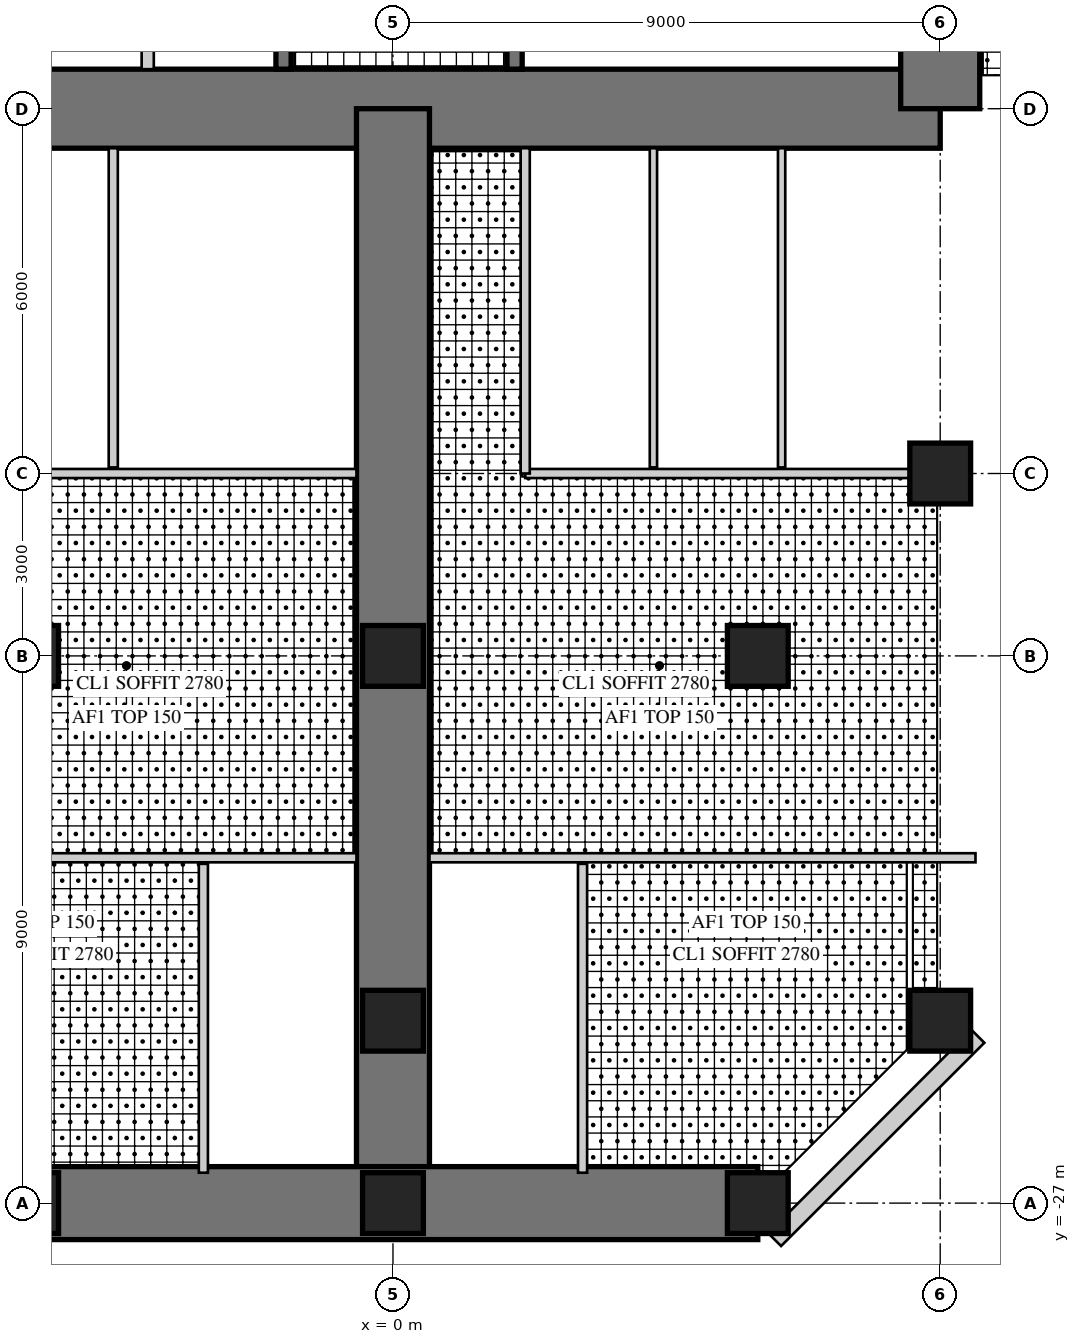
"""IFC4 building model, lengths in metres.
Left out: names, types, materials, properties, quantities, classifications, styles, units other than length and angle.
Written with IfcOpenShell. Run it as: python <this file> out.ifc"""

import sys

from ifc_helpers import new_model, si_unit, direction, frame, frame_2d, origin, origin_2d, place, context, subcontext, project, spatial, rectangle, hollow_rectangle, extrude, element, fill, save


model = new_model("IFC4")
c1 = context("Model", 3, precision=1e-05, world=origin(), true_north=direction((0.0, 1.0)))
c2 = subcontext(c1, "Body", "Model", "MODEL_VIEW")
j1 = project(units=[si_unit("LENGTHUNIT", "METRE"), si_unit("PLANEANGLEUNIT", "RADIAN")], contexts=[c1])
p1 = place(None, origin())
s1 = spatial("IfcSite", under=j1, at=p1, CompositionType="ELEMENT")
p2 = place(p1, origin())
s2 = spatial("IfcBuilding", under=s1, at=p2, CompositionType="ELEMENT")
p3 = place(p2, frame((0.0, 0.0, 152.5)))
s3 = spatial("IfcBuildingStorey", under=s2, at=p3, CompositionType="ELEMENT", Elevation=152.5)
p4 = place(p3, frame((-9.0, -9.0, 0.0), z_axis=(0.0, 0.0, 1.0), x_axis=(1.0, 0.0, 0.0)))
e1 = element("IfcWall", 1, at=p4, inside=s3, PredefinedType="SHEAR", context=c2, shape_type="SweptSolid", body=[
    extrude(rectangle(XDim=18.0, YDim=1.3, at=frame_2d((9.0, 0.0))), origin(), (0.0, 0.0, 1.0), 4.0),
])
p5 = place(p4, frame((9.8, 0.0, 0.0)))
e2 = element("IfcOpeningElement", 2, at=p5, cuts=e1, PredefinedType="OPENING", context=c2, shape_type="SweptSolid", body=[
    extrude(rectangle(XDim=1.0, YDim=2.4, at=frame_2d((0.5, 1.2))), frame((0.0, 0.66, 0.0), z_axis=(0.0, -1.0, 0.0), x_axis=(1.0, 0.0, 0.0)), (0.0, 0.0, 1.0), 1.32),
])
p6 = place(p3, frame((9.0, -9.0, 0.0), z_axis=(0.0, 0.0, 1.0), x_axis=(0.0, 1.0, 0.0)))
e3 = element("IfcWall", 3, at=p6, inside=s3, PredefinedType="SHEAR", context=c2, shape_type="SweptSolid", body=[
    extrude(rectangle(XDim=18.0, YDim=1.3, at=frame_2d((9.0, 0.0))), origin(), (0.0, 0.0, 1.0), 4.0),
])
p7 = place(p6, frame((9.8, 0.0, 0.0)))
e4 = element("IfcOpeningElement", 4, at=p7, cuts=e3, PredefinedType="OPENING", context=c2, shape_type="SweptSolid", body=[
    extrude(rectangle(XDim=1.0, YDim=2.4, at=frame_2d((0.5, 1.2))), frame((0.0, 0.66, 0.0), z_axis=(0.0, -1.0, 0.0), x_axis=(1.0, 0.0, 0.0)), (0.0, 0.0, 1.0), 1.32),
])
p8 = place(p3, frame((-1.8, -1.875, 0.0), z_axis=(0.0, 0.0, 1.0), x_axis=(0.0, -1.0, 0.0)))
e5 = element("IfcWall", 5, at=p8, inside=s3, PredefinedType="SHEAR", context=c2, shape_type="SweptSolid", body=[
    extrude(rectangle(XDim=6.475, YDim=0.25, at=frame_2d((3.238, 0.0))), origin(), (0.0, 0.0, 1.0), 4.0),
])
p9 = place(p8, frame((1.875, 0.0, 0.0)))
e6 = element("IfcOpeningElement", 6, at=p9, cuts=e5, PredefinedType="OPENING", context=c2, shape_type="SweptSolid", body=[
    extrude(rectangle(XDim=1.6, YDim=2.4, at=frame_2d((0.8, 1.2))), frame((0.0, 0.135, 0.0), z_axis=(0.0, -1.0, 0.0), x_axis=(1.0, 0.0, 0.0)), (0.0, 0.0, 1.0), 0.27),
])
p10 = place(p3, frame((-4.033, -5.975, 0.0), z_axis=(0.0, 0.0, 1.0), x_axis=(0.0, -1.0, 0.0)))
e7 = element("IfcWall", 7, at=p10, inside=s3, PredefinedType="PARTITIONING", context=c2, shape_type="SweptSolid", body=[
    extrude(rectangle(XDim=2.375, YDim=0.2, at=frame_2d((1.188, 0.0))), origin(), (0.0, 0.0, 1.0), 4.0),
])
p11 = place(p3, frame((2.0, -1.675, 0.0), z_axis=(0.0, 0.0, 1.0), x_axis=(0.0, -1.0, 0.0)))
e8 = element("IfcWall", 8, at=p11, inside=s3, PredefinedType="SHEAR", context=c2, shape_type="SweptSolid", body=[
    extrude(rectangle(XDim=6.675, YDim=0.25, at=frame_2d((3.337, 0.0))), origin(), (0.0, 0.0, 1.0), 4.0),
])
p12 = place(p11, frame((0.725, 0.0, 0.0)))
e9 = element("IfcOpeningElement", 9, at=p12, cuts=e8, PredefinedType="OPENING", context=c2, shape_type="SweptSolid", body=[
    extrude(rectangle(XDim=1.0, YDim=2.1, at=frame_2d((0.5, 1.05))), frame((0.0, 0.135, 0.0), z_axis=(0.0, -1.0, 0.0), x_axis=(1.0, 0.0, 0.0)), (0.0, 0.0, 1.0), 0.27),
])
p13 = place(p3, frame((0.0, -9.0, 0.0), z_axis=(0.0, 0.0, 1.0), x_axis=(0.0, -1.0, 0.0)))
e10 = element("IfcWall", 10, at=p13, inside=s3, PredefinedType="SHEAR", context=c2, shape_type="SweptSolid", body=[
    extrude(rectangle(XDim=18.0, YDim=1.2, at=frame_2d((9.0, 0.0))), origin(), (0.0, 0.0, 1.0), 4.0),
])
p14 = place(p13, frame((9.8, 0.0, 0.0)))
e11 = element("IfcOpeningElement", 11, at=p14, cuts=e10, PredefinedType="OPENING", context=c2, shape_type="SweptSolid", body=[
    extrude(rectangle(XDim=1.0, YDim=2.2, at=frame_2d((0.5, 1.1))), frame((0.0, 0.61, 0.0), z_axis=(0.0, -1.0, 0.0), x_axis=(1.0, 0.0, 0.0)), (0.0, 0.0, 1.0), 1.22),
])
p15 = place(p3, frame((-6.0, -27.0, 0.0), z_axis=(0.0, 0.0, 1.0), x_axis=(1.0, 0.0, 0.0)))
e12 = element("IfcWall", 12, at=p15, inside=s3, PredefinedType="SHEAR", context=c2, shape_type="SweptSolid", body=[
    extrude(rectangle(XDim=12.0, YDim=1.2, at=frame_2d((6.0, 0.0))), origin(), (0.0, 0.0, 1.0), 4.0),
])
p16 = place(p15, frame((1.55, 0.0, 0.6)))
e13 = element("IfcOpeningElement", 13, at=p16, cuts=e12, PredefinedType="OPENING", context=c2, shape_type="SweptSolid", body=[
    extrude(rectangle(XDim=3.0, YDim=2.4, at=frame_2d((1.5, 1.2))), frame((0.0, 0.61, 0.0), z_axis=(0.0, -1.0, 0.0), x_axis=(1.0, 0.0, 0.0)), (0.0, 0.0, 1.0), 1.22),
])
p17 = place(p15, frame((7.45, 0.0, 0.6)))
e14 = element("IfcOpeningElement", 14, at=p17, cuts=e12, PredefinedType="OPENING", context=c2, shape_type="SweptSolid", body=[
    extrude(rectangle(XDim=3.0, YDim=2.4, at=frame_2d((1.5, 1.2))), frame((0.0, 0.61, 0.0), z_axis=(0.0, -1.0, 0.0), x_axis=(1.0, 0.0, 0.0)), (0.0, 0.0, 1.0), 1.22),
])
for number, where, z_axis, x_axis in (
    (15, (9.0, -15.0, 0.0), (0.0, 0.0, 1.0), (1.0, 0.0, 0.0)),
    (16, (9.0, -24.0, 0.0), (0.0, 0.0, 1.0), (1.0, 0.0, 0.0)),
    (17, (-6.0, -27.0, 0.0), (0.0, 0.0, 1.0), (1.0, 0.0, 0.0)),
    (18, (0.0, -27.0, 0.0), (0.0, 0.0, 1.0), (1.0, 0.0, 0.0)),
    (19, (6.0, -27.0, 0.0), (0.0, 0.0, 1.0), (1.0, 0.0, 0.0)),
    (20, (-6.0, -18.0, 0.0), (0.0, 0.0, 1.0), (1.0, 0.0, 0.0)),
    (21, (0.0, -18.0, 0.0), (0.0, 0.0, 1.0), (1.0, 0.0, 0.0)),
    (22, (6.0, -18.0, 0.0), (0.0, 0.0, 1.0), (1.0, 0.0, 0.0)),
    (23, (0.0, -24.0, 0.0), (0.0, 0.0, 1.0), (1.0, 0.0, 0.0)),
):
    element("IfcColumn", number, at=place(p3, frame(where, z_axis=z_axis, x_axis=x_axis)), inside=s3, PredefinedType="COLUMN", context=c2, shape_type="SweptSolid", body=[
        extrude(rectangle(XDim=1.0, YDim=1.0, at=origin_2d()), origin(), (0.0, 0.0, 1.0), 4.0),
    ])
p18 = place(p3, frame((6.277, -27.6, 0.0), z_axis=(0.0, 0.0, 1.0), x_axis=(0.707106781187, 0.707106781187, 0.0)))
e24 = element("IfcWall", 24, at=p18, inside=s3, PredefinedType="SOLIDWALL", context=c2, shape_type="SweptSolid", body=[
    extrude(rectangle(XDim=4.728, YDim=0.3, at=frame_2d((2.364, 0.0))), origin(), (0.0, 0.0, 1.0), 3.8),
])
p19 = place(p18, frame((1.914, 0.0, 0.3)))
e25 = element("IfcOpeningElement", 25, at=p19, cuts=e24, PredefinedType="OPENING", context=c2, shape_type="SweptSolid", body=[
    extrude(rectangle(XDim=0.9, YDim=2.4, at=frame_2d((0.45, 1.2))), frame((0.0, 0.16, 0.0), z_axis=(0.0, -1.0, 0.0), x_axis=(1.0, 0.0, 0.0)), (0.0, 0.0, 1.0), 0.32),
])
p20 = place(p3, frame((2.175, -15.0, 0.0), z_axis=(0.0, 0.0, 1.0), x_axis=(1.0, 0.0, 0.0)))
e26 = element("IfcWall", 26, at=p20, inside=s3, PredefinedType="PARTITIONING", context=c2, shape_type="SweptSolid", body=[
    extrude(rectangle(XDim=6.325, YDim=0.15, at=frame_2d((3.163, 0.0))), origin(), (0.0, 0.0, 1.0), 3.0),
])
p21 = place(p20, frame((0.554, 0.0, 0.0)))
e27 = element("IfcOpeningElement", 27, at=p21, cuts=e26, PredefinedType="OPENING", context=c2, shape_type="SweptSolid", body=[
    extrude(rectangle(XDim=1.0, YDim=2.1, at=frame_2d((0.5, 1.05))), frame((0.0, 0.085, 0.0), z_axis=(0.0, -1.0, 0.0), x_axis=(1.0, 0.0, 0.0)), (0.0, 0.0, 1.0), 0.17),
])
p22 = place(p20, frame((2.663, 0.0, 0.0)))
e28 = element("IfcOpeningElement", 28, at=p22, cuts=e26, PredefinedType="OPENING", context=c2, shape_type="SweptSolid", body=[
    extrude(rectangle(XDim=1.0, YDim=2.1, at=frame_2d((0.5, 1.05))), frame((0.0, 0.085, 0.0), z_axis=(0.0, -1.0, 0.0), x_axis=(1.0, 0.0, 0.0)), (0.0, 0.0, 1.0), 0.17),
])
p23 = place(p20, frame((4.771, 0.0, 0.0)))
e29 = element("IfcOpeningElement", 29, at=p23, cuts=e26, PredefinedType="OPENING", context=c2, shape_type="SweptSolid", body=[
    extrude(rectangle(XDim=1.0, YDim=2.1, at=frame_2d((0.5, 1.05))), frame((0.0, 0.085, 0.0), z_axis=(0.0, -1.0, 0.0), x_axis=(1.0, 0.0, 0.0)), (0.0, 0.0, 1.0), 0.17),
])
p24 = place(p3, frame((2.175, -9.65, 0.0), z_axis=(0.0, 0.0, 1.0), x_axis=(0.0, -1.0, 0.0)))
e30 = element("IfcWall", 30, at=p24, inside=s3, PredefinedType="PARTITIONING", context=c2, shape_type="SweptSolid", body=[
    extrude(rectangle(XDim=5.35, YDim=0.15, at=frame_2d((2.675, 0.0))), origin(), (0.0, 0.0, 1.0), 3.8),
])
for number, where, z_axis, x_axis in (
    (31, (4.283, -9.65, 0.0), (0.0, 0.0, 1.0), (0.0, -1.0, 0.0)),
    (32, (6.392, -9.65, 0.0), (0.0, 0.0, 1.0), (0.0, -1.0, 0.0)),
):
    element("IfcWall", number, at=place(p3, frame(where, z_axis=z_axis, x_axis=x_axis)), inside=s3, PredefinedType="PLUMBINGWALL", context=c2, shape_type="SweptSolid", body=[
        extrude(rectangle(XDim=5.25, YDim=0.12, at=frame_2d((2.625, 0.0))), origin(), (0.0, 0.0, 1.0), 3.8),
    ])
p25 = place(p3, frame((-8.5, -15.0, 0.0), z_axis=(0.0, 0.0, 1.0), x_axis=(1.0, 0.0, 0.0)))
e33 = element("IfcWall", 33, at=p25, inside=s3, PredefinedType="PARTITIONING", context=c2, shape_type="SweptSolid", body=[
    extrude(rectangle(XDim=7.9, YDim=0.15, at=frame_2d((3.95, 0.0))), origin(), (0.0, 0.0, 1.0), 3.0),
])
p26 = place(p25, frame((1.45, 0.0, 0.0)))
e34 = element("IfcOpeningElement", 34, at=p26, cuts=e33, PredefinedType="OPENING", context=c2, shape_type="SweptSolid", body=[
    extrude(rectangle(XDim=1.0, YDim=2.1, at=frame_2d((0.5, 1.05))), frame((0.0, 0.085, 0.0), z_axis=(0.0, -1.0, 0.0), x_axis=(1.0, 0.0, 0.0)), (0.0, 0.0, 1.0), 0.17),
])
p27 = place(p25, frame((5.4, 0.0, 0.0)))
e35 = element("IfcOpeningElement", 35, at=p27, cuts=e33, PredefinedType="OPENING", context=c2, shape_type="SweptSolid", body=[
    extrude(rectangle(XDim=1.0, YDim=2.1, at=frame_2d((0.5, 1.05))), frame((0.0, 0.085, 0.0), z_axis=(0.0, -1.0, 0.0), x_axis=(1.0, 0.0, 0.0)), (0.0, 0.0, 1.0), 0.17),
])
p28 = place(p3, frame((-4.6, -9.65, 0.0), z_axis=(0.0, 0.0, 1.0), x_axis=(0.0, -1.0, 0.0)))
e36 = element("IfcWall", 36, at=p28, inside=s3, PredefinedType="PARTITIONING", context=c2, shape_type="SweptSolid", body=[
    extrude(rectangle(XDim=5.25, YDim=0.15, at=frame_2d((2.625, 0.0))), origin(), (0.0, 0.0, 1.0), 3.8),
])
p29 = place(p3, frame((3.118, -21.42, 0.0), z_axis=(0.0, 0.0, 1.0), x_axis=(0.0, -1.0, 0.0)))
e37 = element("IfcWall", 37, at=p29, inside=s3, PredefinedType="PARTITIONING", context=c2, shape_type="SweptSolid", body=[
    extrude(rectangle(XDim=5.08, YDim=0.15, at=frame_2d((2.54, 0.0))), origin(), (0.0, 0.0, 1.0), 3.8),
])
p30 = place(p3, frame((0.6, -21.32, 0.0), z_axis=(0.0, 0.0, 1.0), x_axis=(1.0, 0.0, 0.0)))
e38 = element("IfcWall", 38, at=p30, inside=s3, PredefinedType="PARTITIONING", context=c2, shape_type="SweptSolid", body=[
    extrude(rectangle(XDim=8.98, YDim=0.15, at=frame_2d((4.49, 0.0))), origin(), (0.0, 0.0, 1.0), 3.8),
])
p31 = place(p30, frame((0.35, 0.0, 0.0)))
e39 = element("IfcOpeningElement", 39, at=p31, cuts=e38, PredefinedType="OPENING", context=c2, shape_type="SweptSolid", body=[
    extrude(rectangle(XDim=1.0, YDim=2.2, at=frame_2d((0.5, 1.1))), frame((0.0, 0.085, 0.0), z_axis=(0.0, -1.0, 0.0), x_axis=(1.0, 0.0, 0.0)), (0.0, 0.0, 1.0), 0.17),
])
p32 = place(p30, frame((2.993, 0.0, 0.0)))
e40 = element("IfcOpeningElement", 40, at=p32, cuts=e38, PredefinedType="OPENING", context=c2, shape_type="SweptSolid", body=[
    extrude(rectangle(XDim=1.0, YDim=2.2, at=frame_2d((0.5, 1.1))), frame((0.0, 0.085, 0.0), z_axis=(0.0, -1.0, 0.0), x_axis=(1.0, 0.0, 0.0)), (0.0, 0.0, 1.0), 0.17),
])
p33 = place(p3, frame((-3.118, -21.42, 0.0), z_axis=(0.0, 0.0, 1.0), x_axis=(0.0, -1.0, 0.0)))
e41 = element("IfcWall", 41, at=p33, inside=s3, PredefinedType="PARTITIONING", context=c2, shape_type="SweptSolid", body=[
    extrude(rectangle(XDim=5.08, YDim=0.15, at=frame_2d((2.54, 0.0))), origin(), (0.0, 0.0, 1.0), 3.8),
])
p34 = place(p3, frame((-9.58, -21.32, 0.0), z_axis=(0.0, 0.0, 1.0), x_axis=(1.0, 0.0, 0.0)))
e42 = element("IfcWall", 42, at=p34, inside=s3, PredefinedType="PARTITIONING", context=c2, shape_type="SweptSolid", body=[
    extrude(rectangle(XDim=8.98, YDim=0.15, at=frame_2d((4.49, 0.0))), origin(), (0.0, 0.0, 1.0), 3.8),
])
p35 = place(p34, frame((4.987, 0.0, 0.0)))
e43 = element("IfcOpeningElement", 43, at=p35, cuts=e42, PredefinedType="OPENING", context=c2, shape_type="SweptSolid", body=[
    extrude(rectangle(XDim=1.0, YDim=2.2, at=frame_2d((0.5, 1.1))), frame((0.0, 0.085, 0.0), z_axis=(0.0, -1.0, 0.0), x_axis=(1.0, 0.0, 0.0)), (0.0, 0.0, 1.0), 0.17),
])
p36 = place(p34, frame((7.63, 0.0, 0.0)))
e44 = element("IfcOpeningElement", 44, at=p36, cuts=e42, PredefinedType="OPENING", context=c2, shape_type="SweptSolid", body=[
    extrude(rectangle(XDim=1.0, YDim=2.2, at=frame_2d((0.5, 1.1))), frame((0.0, 0.085, 0.0), z_axis=(0.0, -1.0, 0.0), x_axis=(1.0, 0.0, 0.0)), (0.0, 0.0, 1.0), 0.17),
])
p37 = place(p16, origin())
e45 = element("IfcWindow", 45, at=p37, inside=s3, PartitioningType="SINGLE_PANEL", PredefinedType="WINDOW", context=c2, shape_type="SweptSolid", body=[
    extrude(hollow_rectangle(XDim=3.0, YDim=2.4, WallThickness=0.06, at=frame_2d((1.5, 1.2))), frame((0.0, 0.03, 0.0), z_axis=(0.0, -1.0, 0.0), x_axis=(1.0, 0.0, 0.0)), (0.0, 0.0, 1.0), 0.06),
    extrude(rectangle(XDim=2.879, YDim=2.279, at=frame_2d((1.5, 1.2))), frame((0.0, 0.03, 0.0), z_axis=(0.0, -1.0, 0.0), x_axis=(1.0, 0.0, 0.0)), (0.0, 0.0, 1.0), 0.06),
])
fill(e13, e45)
p38 = place(p17, origin())
e46 = element("IfcWindow", 46, at=p38, inside=s3, PartitioningType="SINGLE_PANEL", PredefinedType="WINDOW", context=c2, shape_type="SweptSolid", body=[
    extrude(hollow_rectangle(XDim=3.0, YDim=2.4, WallThickness=0.06, at=frame_2d((1.5, 1.2))), frame((0.0, 0.03, 0.0), z_axis=(0.0, -1.0, 0.0), x_axis=(1.0, 0.0, 0.0)), (0.0, 0.0, 1.0), 0.06),
    extrude(rectangle(XDim=2.879, YDim=2.279, at=frame_2d((1.5, 1.2))), frame((0.0, 0.03, 0.0), z_axis=(0.0, -1.0, 0.0), x_axis=(1.0, 0.0, 0.0)), (0.0, 0.0, 1.0), 0.06),
])
fill(e14, e46)
p39 = place(p19, origin())
e47 = element("IfcWindow", 47, at=p39, inside=s3, PartitioningType="SINGLE_PANEL", PredefinedType="WINDOW", context=c2, shape_type="SweptSolid", body=[
    extrude(hollow_rectangle(XDim=0.9, YDim=2.4, WallThickness=0.06, at=frame_2d((0.45, 1.2))), frame((0.0, 0.03, 0.0), z_axis=(0.0, -1.0, 0.0), x_axis=(1.0, 0.0, 0.0)), (0.0, 0.0, 1.0), 0.06),
    extrude(rectangle(XDim=0.779, YDim=2.279, at=frame_2d((0.45, 1.2))), frame((0.0, 0.03, 0.0), z_axis=(0.0, -1.0, 0.0), x_axis=(1.0, 0.0, 0.0)), (0.0, 0.0, 1.0), 0.06),
])
fill(e25, e47)
p40 = place(p21, origin())
e48 = element("IfcDoor", 48, at=p40, inside=s3, OperationType="SINGLE_SWING_LEFT", PredefinedType="DOOR", context=c2, shape_type="SweptSolid", body=[
    extrude(rectangle(XDim=1.0, YDim=2.1, at=frame_2d((0.5, 1.05))), frame((0.0, 0.025, 0.0), z_axis=(0.0, -1.0, 0.0), x_axis=(1.0, 0.0, 0.0)), (0.0, 0.0, 1.0), 0.05),
])
fill(e27, e48)
p41 = place(p22, origin())
e49 = element("IfcDoor", 49, at=p41, inside=s3, OperationType="SINGLE_SWING_LEFT", PredefinedType="DOOR", context=c2, shape_type="SweptSolid", body=[
    extrude(rectangle(XDim=1.0, YDim=2.1, at=frame_2d((0.5, 1.05))), frame((0.0, 0.025, 0.0), z_axis=(0.0, -1.0, 0.0), x_axis=(1.0, 0.0, 0.0)), (0.0, 0.0, 1.0), 0.05),
])
fill(e28, e49)
p42 = place(p23, origin())
e50 = element("IfcDoor", 50, at=p42, inside=s3, OperationType="SINGLE_SWING_LEFT", PredefinedType="DOOR", context=c2, shape_type="SweptSolid", body=[
    extrude(rectangle(XDim=1.0, YDim=2.1, at=frame_2d((0.5, 1.05))), frame((0.0, 0.025, 0.0), z_axis=(0.0, -1.0, 0.0), x_axis=(1.0, 0.0, 0.0)), (0.0, 0.0, 1.0), 0.05),
])
fill(e29, e50)
p43 = place(p27, origin())
e51 = element("IfcDoor", 51, at=p43, inside=s3, OperationType="SINGLE_SWING_LEFT", PredefinedType="DOOR", context=c2, shape_type="SweptSolid", body=[
    extrude(rectangle(XDim=1.0, YDim=2.1, at=frame_2d((0.5, 1.05))), frame((0.0, 0.025, 0.0), z_axis=(0.0, -1.0, 0.0), x_axis=(1.0, 0.0, 0.0)), (0.0, 0.0, 1.0), 0.05),
])
fill(e35, e51)
p44 = place(p31, frame((1.0, 0.0, 0.0), z_axis=(0.0, 0.0, 1.0), x_axis=(-1.0, 0.0, 0.0)))
e52 = element("IfcDoor", 52, at=p44, inside=s3, OperationType="SINGLE_SWING_RIGHT", PredefinedType="DOOR", context=c2, shape_type="SweptSolid", body=[
    extrude(rectangle(XDim=1.0, YDim=2.2, at=frame_2d((0.5, 1.1))), frame((0.0, 0.025, 0.0), z_axis=(0.0, -1.0, 0.0), x_axis=(1.0, 0.0, 0.0)), (0.0, 0.0, 1.0), 0.05),
])
fill(e39, e52)
p45 = place(p32, frame((1.0, 0.0, 0.0), z_axis=(0.0, 0.0, 1.0), x_axis=(-1.0, 0.0, 0.0)))
e53 = element("IfcDoor", 53, at=p45, inside=s3, OperationType="SINGLE_SWING_RIGHT", PredefinedType="DOOR", context=c2, shape_type="SweptSolid", body=[
    extrude(rectangle(XDim=1.0, YDim=2.2, at=frame_2d((0.5, 1.1))), frame((0.0, 0.025, 0.0), z_axis=(0.0, -1.0, 0.0), x_axis=(1.0, 0.0, 0.0)), (0.0, 0.0, 1.0), 0.05),
])
fill(e40, e53)
p46 = place(p35, frame((1.0, 0.0, 0.0), z_axis=(0.0, 0.0, 1.0), x_axis=(-1.0, 0.0, 0.0)))
e54 = element("IfcDoor", 54, at=p46, inside=s3, OperationType="SINGLE_SWING_LEFT", PredefinedType="DOOR", context=c2, shape_type="SweptSolid", body=[
    extrude(rectangle(XDim=1.0, YDim=2.2, at=frame_2d((0.5, 1.1))), frame((0.0, 0.025, 0.0), z_axis=(0.0, -1.0, 0.0), x_axis=(1.0, 0.0, 0.0)), (0.0, 0.0, 1.0), 0.05),
])
fill(e43, e54)
p47 = place(p36, frame((1.0, 0.0, 0.0), z_axis=(0.0, 0.0, 1.0), x_axis=(-1.0, 0.0, 0.0)))
e55 = element("IfcDoor", 55, at=p47, inside=s3, OperationType="SINGLE_SWING_LEFT", PredefinedType="DOOR", context=c2, shape_type="SweptSolid", body=[
    extrude(rectangle(XDim=1.0, YDim=2.2, at=frame_2d((0.5, 1.1))), frame((0.0, 0.025, 0.0), z_axis=(0.0, -1.0, 0.0), x_axis=(1.0, 0.0, 0.0)), (0.0, 0.0, 1.0), 0.05),
])
fill(e44, e55)
p48 = place(p14, frame((1.0, 0.0, 0.0), z_axis=(0.0, 0.0, 1.0), x_axis=(-1.0, 0.0, 0.0)))
e56 = element("IfcDoor", 56, at=p48, inside=s3, OperationType="SINGLE_SWING_LEFT", PredefinedType="DOOR", context=c2, shape_type="SweptSolid", body=[
    extrude(rectangle(XDim=1.0, YDim=2.2, at=frame_2d((0.5, 1.1))), frame((0.0, 0.025, 0.0), z_axis=(0.0, -1.0, 0.0), x_axis=(1.0, 0.0, 0.0)), (0.0, 0.0, 1.0), 0.05),
])
fill(e11, e56)
p49 = place(p5, frame((1.0, 0.0, 0.0), z_axis=(0.0, 0.0, 1.0), x_axis=(-1.0, 0.0, 0.0)))
e57 = element("IfcDoor", 57, at=p49, inside=s3, OperationType="SINGLE_SWING_RIGHT", PredefinedType="DOOR", context=c2, shape_type="SweptSolid", body=[
    extrude(rectangle(XDim=1.0, YDim=2.4, at=frame_2d((0.5, 1.2))), frame((0.0, -0.005, 0.0), z_axis=(0.0, -1.0, 0.0), x_axis=(1.0, 0.0, 0.0)), (0.0, 0.0, 1.0), 0.05),
])
fill(e2, e57)
save(model, sys.argv[1])
